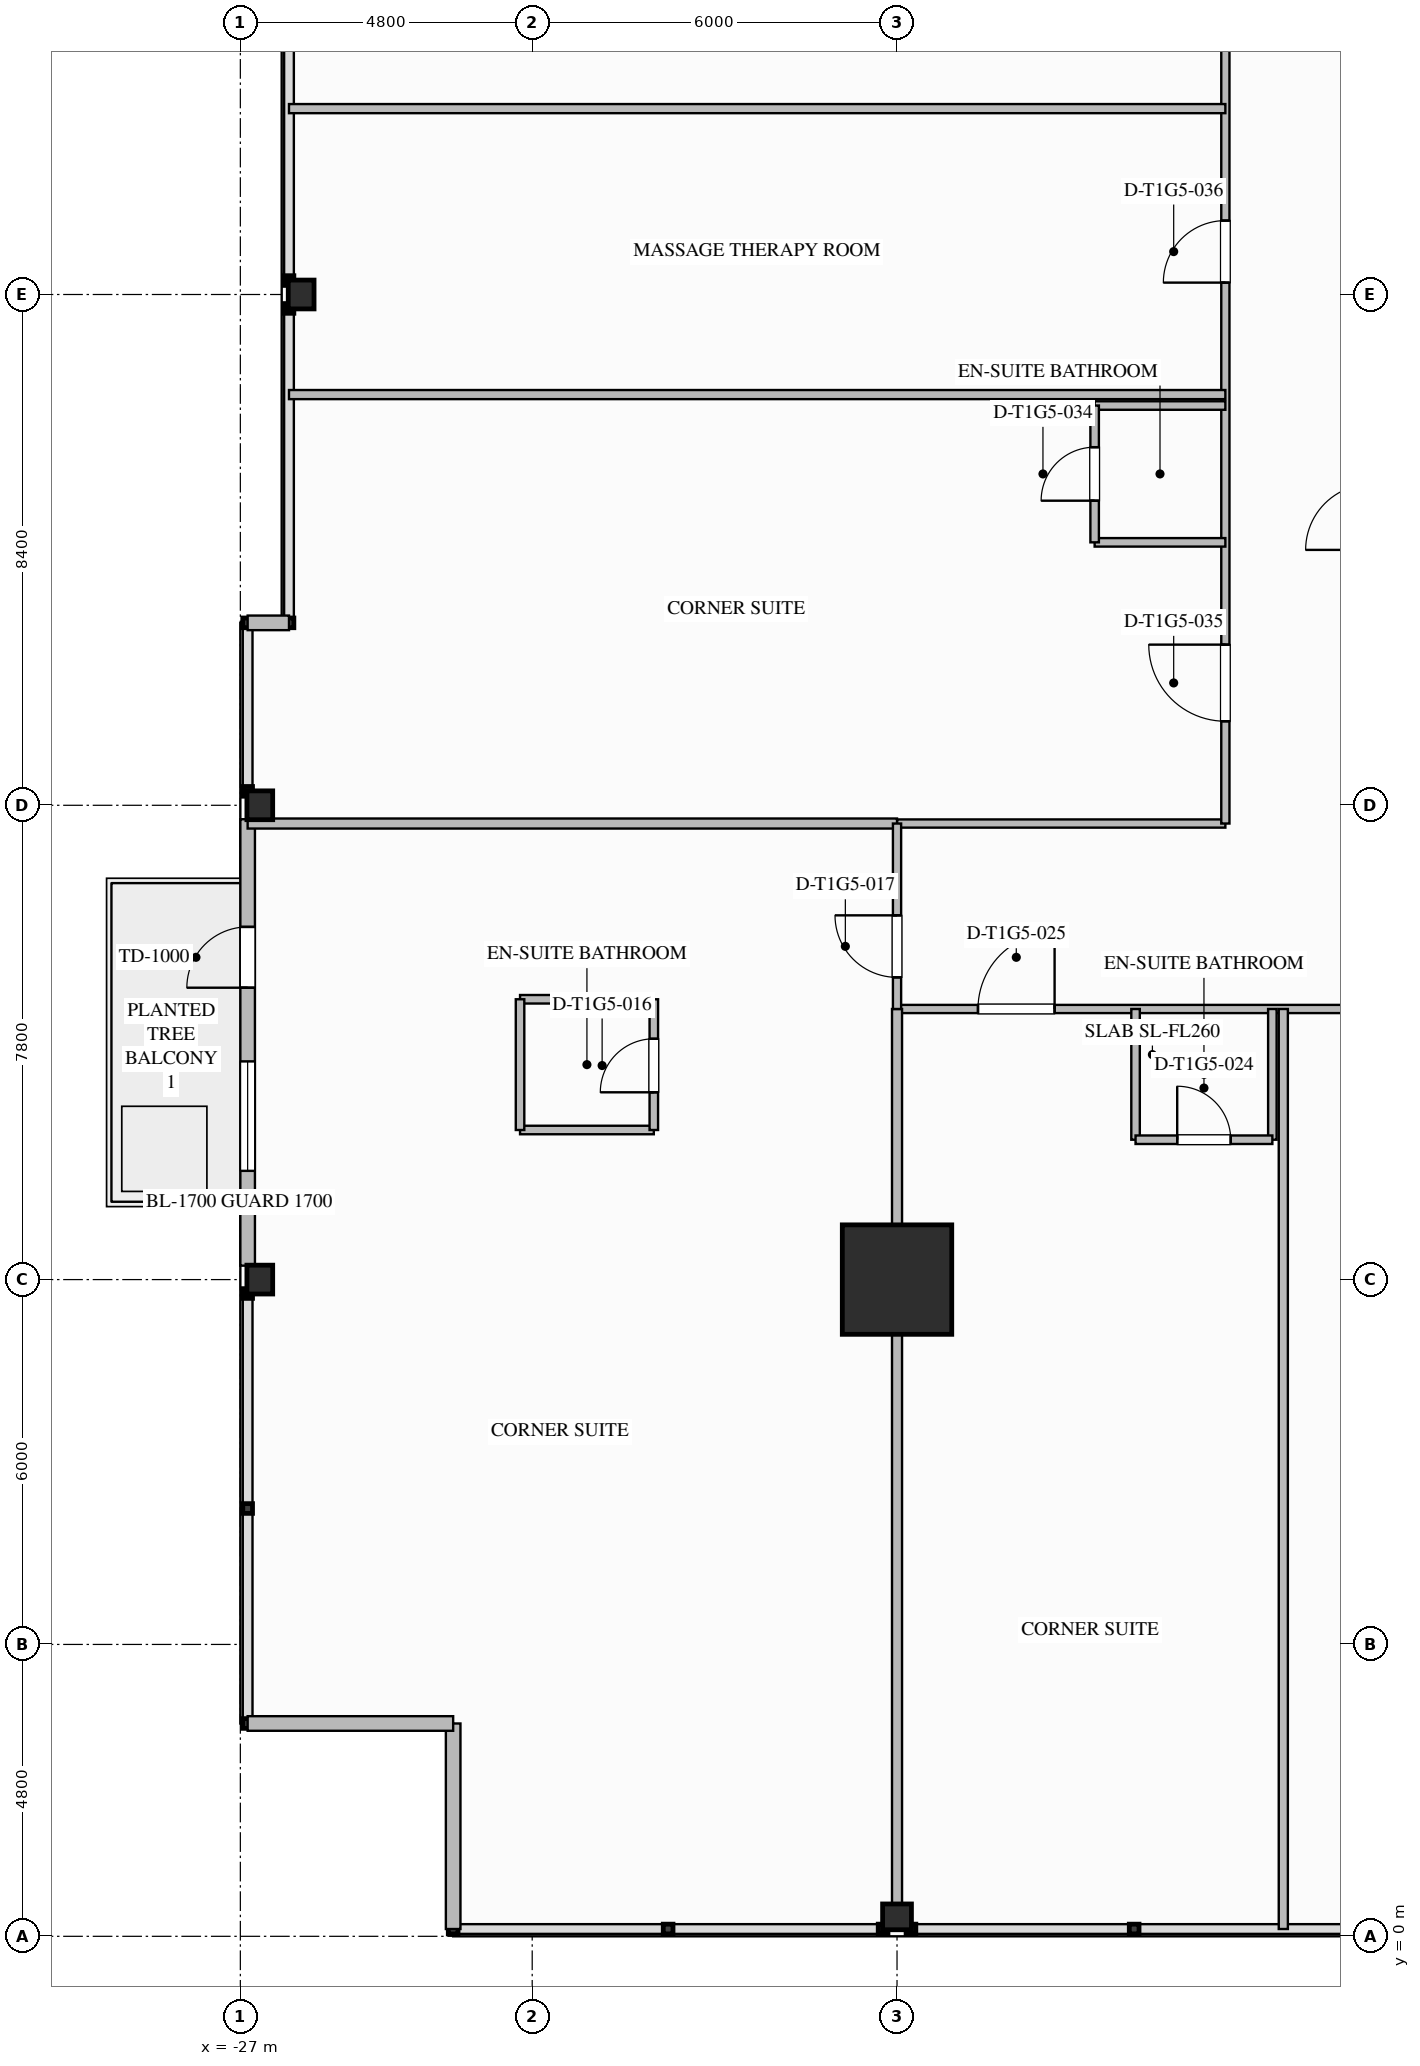
"""IFC4 building model, lengths in metres.
Left out: names, types, materials, properties, quantities, classifications, styles, units other than length and angle.
Written with IfcOpenShell. Run it as: python <this file> out.ifc"""

import sys

from ifc_helpers import new_model, si_unit, direction, frame, frame_2d, origin, origin_2d, place, context, subcontext, project, spatial, rectangle, i_section, extrude, element, fill, save


model = new_model("IFC4")
c1 = context("Model", 3, precision=1e-05, world=origin(), true_north=direction((0.0, 1.0)))
c2 = subcontext(c1, "Body", "Model", "MODEL_VIEW")
j1 = project(units=[si_unit("LENGTHUNIT", "METRE"), si_unit("PLANEANGLEUNIT", "RADIAN")], contexts=[c1])
p1 = place(None, origin())
s1 = spatial("IfcSite", under=j1, at=p1, CompositionType="ELEMENT")
p2 = place(p1, origin())
s2 = spatial("IfcBuilding", under=s1, at=p2, CompositionType="ELEMENT")
p3 = place(p2, frame((0.0, 0.0, 75.2)))
s3 = spatial("IfcBuildingStorey", under=s2, at=p3, CompositionType="ELEMENT", Elevation=75.2)
p4 = place(p3, frame((-16.2, 10.8, 0.0), z_axis=(0.0, 0.0, 1.0), x_axis=(1.0, 0.0, 0.0)))
e1 = element("IfcColumn", 1, at=p4, inside=s3, PredefinedType="COLUMN", context=c2, shape_type="SweptSolid", body=[
    extrude(rectangle(XDim=1.8, YDim=1.8, at=origin_2d()), origin(), (0.0, 0.0, 1.0), 3.5),
])
for number, where, z_axis, x_axis in (
    (2, (-26.68, 10.8, 0.0), (0.0, 0.0, 1.0), (1.0, 0.0, 0.0)),
    (3, (-26.68, 18.6, 0.0), (0.0, 0.0, 1.0), (1.0, 0.0, 0.0)),
    (4, (-26.0, 27.0, 0.0), (0.0, 0.0, 1.0), (1.0, 0.0, 0.0)),
    (5, (-16.2, 0.32, 0.0), (0.0, 0.0, 1.0), (0.0, 1.0, 0.0)),
):
    element("IfcColumn", number, at=place(p3, frame(where, z_axis=z_axis, x_axis=x_axis)), inside=s3, PredefinedType="COLUMN", context=c2, shape_type="SweptSolid", body=[
        extrude(i_section(OverallWidth=0.424, OverallDepth=0.474, WebThickness=0.048, FlangeThickness=0.077, FilletRadius=0.03, at=origin_2d()), origin(), (0.0, 0.0, 1.0), 3.497),
    ])
p5 = place(p3, frame((-26.88, 11.029, 0.0), z_axis=(0.0, 0.0, 1.0), x_axis=(0.0, 1.0, 0.0)))
e6 = element("IfcWall", 6, at=p5, inside=s3, PredefinedType="STANDARD", context=c2, shape_type="SweptSolid", body=[
    extrude(rectangle(XDim=7.342, YDim=0.24, at=frame_2d((3.671, 0.0))), origin(), (0.0, 0.0, 1.0), 2.629),
])
p6 = place(p5, frame((4.571, 0.0, 0.0)))
e7 = element("IfcOpeningElement", 7, at=p6, cuts=e6, PredefinedType="OPENING", context=c2, shape_type="SweptSolid", body=[
    extrude(rectangle(XDim=1.0, YDim=2.2, at=frame_2d((0.5, 1.1))), frame((0.0, 0.13, 0.0), z_axis=(0.0, -1.0, 0.0), x_axis=(1.0, 0.0, 0.0)), (0.0, 0.0, 1.0), 0.26),
])
p7 = place(p5, frame((1.559, 0.0, 0.75)))
e8 = element("IfcOpeningElement", 8, at=p7, cuts=e6, PredefinedType="OPENING", context=c2, shape_type="SweptSolid", body=[
    extrude(rectangle(XDim=1.8, YDim=1.779, at=frame_2d((0.9, 0.89))), frame((0.0, 0.13, 0.0), z_axis=(0.0, -1.0, 0.0), x_axis=(1.0, 0.0, 0.0)), (0.0, 0.0, 1.0), 0.26),
])
for number, where, z_axis, x_axis in (
    (9, (-23.5, 0.12, 0.0), (0.0, 0.0, 1.0), (0.0, 1.0, 0.0)),
    (10, (-23.5, 3.5, 0.0), (0.0, 0.0, 1.0), (-1.0, 0.0, 0.0)),
):
    element("IfcWall", number, at=place(p3, frame(where, z_axis=z_axis, x_axis=x_axis)), inside=s3, PredefinedType="STANDARD", context=c2, shape_type="SweptSolid", body=[
        extrude(rectangle(XDim=3.38, YDim=0.24, at=frame_2d((1.69, 0.0))), origin(), (0.0, 0.0, 1.0), 3.24),
    ])
p8 = place(p3, frame((-26.88, 21.6, 0.0), z_axis=(0.0, 0.0, 1.0), x_axis=(1.0, 0.0, 0.0)))
e11 = element("IfcWall", 11, at=p8, inside=s3, PredefinedType="STANDARD", context=c2, shape_type="SweptSolid", body=[
    extrude(rectangle(XDim=0.68, YDim=0.24, at=frame_2d((0.34, 0.0))), origin(), (0.0, 0.0, 1.0), 3.24),
])
p9 = place(p3, frame((-16.2, 15.25, 0.0), z_axis=(0.0, 0.0, 1.0), x_axis=(1.0, 0.0, 0.0)))
e12 = element("IfcWall", 12, at=p9, inside=s3, PredefinedType="PARTITIONING", context=c2, shape_type="SweptSolid", body=[
    extrude(rectangle(XDim=32.4, YDim=0.135, at=frame_2d((16.2, 0.0))), origin(), (0.0, 0.0, 1.0), 3.24),
])
p10 = place(p9, frame((1.331, 0.0, 0.0)))
e13 = element("IfcOpeningElement", 13, at=p10, cuts=e12, PredefinedType="OPENING", context=c2, shape_type="SweptSolid", body=[
    extrude(rectangle(XDim=1.26, YDim=2.2, at=frame_2d((0.63, 1.1))), frame((0.0, 0.077, 0.0), z_axis=(0.0, -1.0, 0.0), x_axis=(1.0, 0.0, 0.0)), (0.0, 0.0, 1.0), 0.155),
])
p11 = place(p9, frame((10.925, 0.0, 0.0)))
e14 = element("IfcOpeningElement", 14, at=p11, cuts=e12, PredefinedType="OPENING", context=c2, shape_type="SweptSolid", body=[
    extrude(rectangle(XDim=1.02, YDim=2.15, at=frame_2d((0.51, 1.075))), frame((0.0, 0.077, 0.0), z_axis=(0.0, -1.0, 0.0), x_axis=(1.0, 0.0, 0.0)), (0.0, 0.0, 1.0), 0.155),
])
p12 = place(p9, frame((18.167, 0.0, 0.0)))
e15 = element("IfcOpeningElement", 15, at=p12, cuts=e12, PredefinedType="OPENING", context=c2, shape_type="SweptSolid", body=[
    extrude(rectangle(XDim=1.26, YDim=2.2, at=frame_2d((0.63, 1.1))), frame((0.0, 0.077, 0.0), z_axis=(0.0, -1.0, 0.0), x_axis=(1.0, 0.0, 0.0)), (0.0, 0.0, 1.0), 0.155),
])
p13 = place(p9, frame((28.538, 0.0, 0.0)))
e16 = element("IfcOpeningElement", 16, at=p13, cuts=e12, PredefinedType="OPENING", context=c2, shape_type="SweptSolid", body=[
    extrude(rectangle(XDim=1.26, YDim=2.2, at=frame_2d((0.63, 1.1))), frame((0.0, 0.077, 0.0), z_axis=(0.0, -1.0, 0.0), x_axis=(1.0, 0.0, 0.0)), (0.0, 0.0, 1.0), 0.155),
])
p14 = place(p3, frame((-16.2, 18.3, 0.0), z_axis=(0.0, 0.0, 1.0), x_axis=(1.0, 0.0, 0.0)))
e17 = element("IfcWall", 17, at=p14, inside=s3, PredefinedType="PARTITIONING", context=c2, shape_type="SweptSolid", body=[
    extrude(rectangle(XDim=5.4, YDim=0.135, at=frame_2d((2.7, 0.0))), origin(), (0.0, 0.0, 1.0), 3.24),
])
p15 = place(p3, frame((-10.8, 18.3, 0.0), z_axis=(0.0, 0.0, 1.0), x_axis=(0.0, 1.0, 0.0)))
e18 = element("IfcWall", 18, at=p15, inside=s3, PredefinedType="PARTITIONING", context=c2, shape_type="SweptSolid", body=[
    extrude(rectangle(XDim=17.4, YDim=0.135, at=frame_2d((8.7, 0.0))), origin(), (0.0, 0.0, 1.0), 3.24),
])
p16 = place(p15, frame((1.682, 0.0, 0.0)))
e19 = element("IfcOpeningElement", 19, at=p16, cuts=e18, PredefinedType="OPENING", context=c2, shape_type="SweptSolid", body=[
    extrude(rectangle(XDim=1.26, YDim=2.2, at=frame_2d((0.63, 1.1))), frame((0.0, 0.077, 0.0), z_axis=(0.0, -1.0, 0.0), x_axis=(1.0, 0.0, 0.0)), (0.0, 0.0, 1.0), 0.155),
])
p17 = place(p15, frame((8.896, 0.0, 0.0)))
e20 = element("IfcOpeningElement", 20, at=p17, cuts=e18, PredefinedType="OPENING", context=c2, shape_type="SweptSolid", body=[
    extrude(rectangle(XDim=1.02, YDim=2.15, at=frame_2d((0.51, 1.075))), frame((0.0, 0.077, 0.0), z_axis=(0.0, -1.0, 0.0), x_axis=(1.0, 0.0, 0.0)), (0.0, 0.0, 1.0), 0.155),
])
p18 = place(p15, frame((12.733, 0.0, 0.0)))
e21 = element("IfcOpeningElement", 21, at=p18, cuts=e18, PredefinedType="OPENING", context=c2, shape_type="SweptSolid", body=[
    extrude(rectangle(XDim=1.26, YDim=2.2, at=frame_2d((0.63, 1.1))), frame((0.0, 0.077, 0.0), z_axis=(0.0, -1.0, 0.0), x_axis=(1.0, 0.0, 0.0)), (0.0, 0.0, 1.0), 0.155),
])
p19 = place(p3, frame((-16.2, 0.12, 0.0), z_axis=(0.0, 0.0, 1.0), x_axis=(0.0, 1.0, 0.0)))
e22 = element("IfcWall", 22, at=p19, inside=s3, PredefinedType="PARTITIONING", context=c2, shape_type="SweptSolid", body=[
    extrude(rectangle(XDim=15.13, YDim=0.165, at=frame_2d((7.565, 0.0))), origin(), (0.0, 0.0, 1.0), 2.452),
])
p20 = place(p3, frame((-26.88, 18.3, 0.0), z_axis=(0.0, 0.0, 1.0), x_axis=(1.0, 0.0, 0.0)))
e23 = element("IfcWall", 23, at=p20, inside=s3, PredefinedType="PARTITIONING", context=c2, shape_type="SweptSolid", body=[
    extrude(rectangle(XDim=10.68, YDim=0.165, at=frame_2d((5.34, 0.0))), origin(), (0.0, 0.0, 1.0), 2.452),
])
p21 = place(p3, frame((-16.2, 15.25, 0.0), z_axis=(0.0, 0.0, 1.0), x_axis=(0.0, 1.0, 0.0)))
e24 = element("IfcWall", 24, at=p21, inside=s3, PredefinedType="PARTITIONING", context=c2, shape_type="SweptSolid", body=[
    extrude(rectangle(XDim=3.05, YDim=0.135, at=frame_2d((1.525, 0.0))), origin(), (0.0, 0.0, 1.0), 2.452),
])
p22 = place(p21, frame((0.52, 0.0, 0.0)))
e25 = element("IfcOpeningElement", 25, at=p22, cuts=e24, PredefinedType="OPENING", context=c2, shape_type="SweptSolid", body=[
    extrude(rectangle(XDim=1.02, YDim=2.15, at=frame_2d((0.51, 1.075))), frame((0.0, 0.077, 0.0), z_axis=(0.0, -1.0, 0.0), x_axis=(1.0, 0.0, 0.0)), (0.0, 0.0, 1.0), 0.155),
])
for number, where, z_axis, x_axis in (
    (26, (-22.4, 13.26, 0.0), (0.0, 0.0, 1.0), (1.0, 0.0, 0.0)),
    (27, (-22.4, 15.41, 0.0), (0.0, 0.0, 1.0), (1.0, 0.0, 0.0)),
):
    element("IfcWall", number, at=place(p3, frame(where, z_axis=z_axis, x_axis=x_axis)), inside=s3, PredefinedType="PLUMBINGWALL", context=c2, shape_type="SweptSolid", body=[
        extrude(rectangle(XDim=2.2, YDim=0.14, at=frame_2d((1.1, 0.0))), origin(), (0.0, 0.0, 1.0), 3.24),
    ])
p23 = place(p3, frame((-22.4, 13.26, 0.0), z_axis=(0.0, 0.0, 1.0), x_axis=(0.0, 1.0, 0.0)))
e28 = element("IfcWall", 28, at=p23, inside=s3, PredefinedType="PLUMBINGWALL", context=c2, shape_type="SweptSolid", body=[
    extrude(rectangle(XDim=2.15, YDim=0.14, at=frame_2d((1.075, 0.0))), origin(), (0.0, 0.0, 1.0), 3.24),
])
p24 = place(p3, frame((-20.2, 13.26, 0.0), z_axis=(0.0, 0.0, 1.0), x_axis=(0.0, 1.0, 0.0)))
e29 = element("IfcWall", 29, at=p24, inside=s3, PredefinedType="PLUMBINGWALL", context=c2, shape_type="SweptSolid", body=[
    extrude(rectangle(XDim=2.15, YDim=0.14, at=frame_2d((1.075, 0.0))), origin(), (0.0, 0.0, 1.0), 3.24),
])
p25 = place(p24, frame((0.62, 0.0, 0.0)))
e30 = element("IfcOpeningElement", 30, at=p25, cuts=e29, PredefinedType="OPENING", context=c2, shape_type="SweptSolid", body=[
    extrude(rectangle(XDim=0.88, YDim=2.1, at=frame_2d((0.44, 1.05))), frame((0.0, 0.08, 0.0), z_axis=(0.0, -1.0, 0.0), x_axis=(1.0, 0.0, 0.0)), (0.0, 0.0, 1.0), 0.16),
])
p26 = place(p3, frame((-12.277, 15.25, 0.0), z_axis=(0.0, 0.0, 1.0), x_axis=(0.0, -1.0, 0.0)))
e31 = element("IfcWall", 31, at=p26, inside=s3, PredefinedType="PLUMBINGWALL", context=c2, shape_type="SweptSolid", body=[
    extrude(rectangle(XDim=2.15, YDim=0.14, at=frame_2d((1.075, 0.0))), origin(), (0.0, 0.0, 1.0), 2.765),
])
p27 = place(p3, frame((-10.027, 15.25, 0.0), z_axis=(0.0, 0.0, 1.0), x_axis=(0.0, -1.0, 0.0)))
e32 = element("IfcWall", 32, at=p27, inside=s3, PredefinedType="PLUMBINGWALL", context=c2, shape_type="SweptSolid", body=[
    extrude(rectangle(XDim=2.15, YDim=0.14, at=frame_2d((1.075, 0.0))), origin(), (0.0, 0.0, 1.0), 3.24),
])
p28 = place(p3, frame((-12.277, 13.1, 0.0), z_axis=(0.0, 0.0, 1.0), x_axis=(1.0, 0.0, 0.0)))
e33 = element("IfcWall", 33, at=p28, inside=s3, PredefinedType="PLUMBINGWALL", context=c2, shape_type="SweptSolid", body=[
    extrude(rectangle(XDim=2.25, YDim=0.14, at=frame_2d((1.125, 0.0))), origin(), (0.0, 0.0, 1.0), 3.24),
])
p29 = place(p28, frame((0.685, 0.0, 0.0)))
e34 = element("IfcOpeningElement", 34, at=p29, cuts=e33, PredefinedType="OPENING", context=c2, shape_type="SweptSolid", body=[
    extrude(rectangle(XDim=0.88, YDim=2.1, at=frame_2d((0.44, 1.05))), frame((0.0, 0.08, 0.0), z_axis=(0.0, -1.0, 0.0), x_axis=(1.0, 0.0, 0.0)), (0.0, 0.0, 1.0), 0.16),
])
p30 = place(p3, frame((-9.847, 0.12, 0.0), z_axis=(0.0, 0.0, 1.0), x_axis=(0.0, 1.0, 0.0)))
e35 = element("IfcWall", 35, at=p30, inside=s3, PredefinedType="PARTITIONING", context=c2, shape_type="SweptSolid", body=[
    extrude(rectangle(XDim=15.13, YDim=0.15, at=frame_2d((7.565, 0.0))), origin(), (0.0, 0.0, 1.0), 3.24),
])
for number, where, z_axis, x_axis in (
    (36, (-10.8, 22.924, 0.0), (0.0, 0.0, 1.0), (-1.0, 0.0, 0.0)),
    (37, (-10.8, 25.174, 0.0), (0.0, 0.0, 1.0), (-1.0, 0.0, 0.0)),
):
    element("IfcWall", number, at=place(p3, frame(where, z_axis=z_axis, x_axis=x_axis)), inside=s3, PredefinedType="PLUMBINGWALL", context=c2, shape_type="SweptSolid", body=[
        extrude(rectangle(XDim=2.15, YDim=0.14, at=frame_2d((1.075, 0.0))), origin(), (0.0, 0.0, 1.0), 3.24),
    ])
p31 = place(p3, frame((-12.95, 22.924, 0.0), z_axis=(0.0, 0.0, 1.0), x_axis=(0.0, 1.0, 0.0)))
e38 = element("IfcWall", 38, at=p31, inside=s3, PredefinedType="PLUMBINGWALL", context=c2, shape_type="SweptSolid", body=[
    extrude(rectangle(XDim=2.25, YDim=0.14, at=frame_2d((1.125, 0.0))), origin(), (0.0, 0.0, 1.0), 3.24),
])
p32 = place(p31, frame((0.685, 0.0, 0.0)))
e39 = element("IfcOpeningElement", 39, at=p32, cuts=e38, PredefinedType="OPENING", context=c2, shape_type="SweptSolid", body=[
    extrude(rectangle(XDim=0.88, YDim=2.1, at=frame_2d((0.44, 1.05))), frame((0.0, 0.08, 0.0), z_axis=(0.0, -1.0, 0.0), x_axis=(1.0, 0.0, 0.0)), (0.0, 0.0, 1.0), 0.16),
])
for number, where, z_axis, x_axis in (
    (40, (-26.2, 25.354, 0.0), (0.0, 0.0, 1.0), (1.0, 0.0, 0.0)),
    (41, (-26.2, 30.057, 0.0), (0.0, 0.0, 1.0), (1.0, 0.0, 0.0)),
):
    element("IfcWall", number, at=place(p3, frame(where, z_axis=z_axis, x_axis=x_axis)), inside=s3, PredefinedType="PARTITIONING", context=c2, shape_type="SweptSolid", body=[
        extrude(rectangle(XDim=15.4, YDim=0.15, at=frame_2d((7.7, 0.0))), origin(), (0.0, 0.0, 1.0), 3.24),
    ])
p33 = place(p6, origin())
e42 = element("IfcDoor", 42, at=p33, inside=s3, OperationType="SINGLE_SWING_LEFT", PredefinedType="DOOR", context=c2, shape_type="SweptSolid", body=[
    extrude(rectangle(XDim=1.0, YDim=2.2, at=frame_2d((0.5, 1.1))), frame((0.0, 0.025, 0.0), z_axis=(0.0, -1.0, 0.0), x_axis=(1.0, 0.0, 0.0)), (0.0, 0.0, 1.0), 0.05),
])
fill(e7, e42)
p34 = place(p7, origin())
e43 = element("IfcWindow", 43, at=p34, inside=s3, PartitioningType="SINGLE_PANEL", PredefinedType="WINDOW", context=c2, shape_type="SweptSolid", body=[
    extrude(rectangle(XDim=1.8, YDim=1.779, at=frame_2d((0.9, 0.89))), frame((0.0, 0.03, 0.0), z_axis=(0.0, -1.0, 0.0), x_axis=(1.0, 0.0, 0.0)), (0.0, 0.0, 1.0), 0.06),
])
fill(e8, e43)
p35 = place(p25, origin())
e44 = element("IfcDoor", 44, at=p35, inside=s3, OperationType="SINGLE_SWING_LEFT", PredefinedType="DOOR", context=c2, shape_type="SweptSolid", body=[
    extrude(rectangle(XDim=0.88, YDim=2.1, at=frame_2d((0.44, 1.05))), frame((0.0, 0.025, 0.0), z_axis=(0.0, -1.0, 0.0), x_axis=(1.0, 0.0, 0.0)), (0.0, 0.0, 1.0), 0.05),
])
fill(e30, e44)
p36 = place(p22, origin())
e45 = element("IfcDoor", 45, at=p36, inside=s3, OperationType="SINGLE_SWING_RIGHT", PredefinedType="DOOR", context=c2, shape_type="SweptSolid", body=[
    extrude(rectangle(XDim=1.02, YDim=2.15, at=frame_2d((0.51, 1.075))), frame((0.0, 0.025, 0.0), z_axis=(0.0, -1.0, 0.0), x_axis=(1.0, 0.0, 0.0)), (0.0, 0.0, 1.0), 0.05),
])
fill(e25, e45)
p37 = place(p29, origin())
e46 = element("IfcDoor", 46, at=p37, inside=s3, OperationType="SINGLE_SWING_LEFT", PredefinedType="DOOR", context=c2, shape_type="SweptSolid", body=[
    extrude(rectangle(XDim=0.88, YDim=2.1, at=frame_2d((0.44, 1.05))), frame((0.0, 0.025, 0.0), z_axis=(0.0, -1.0, 0.0), x_axis=(1.0, 0.0, 0.0)), (0.0, 0.0, 1.0), 0.05),
])
fill(e34, e46)
p38 = place(p10, origin())
e47 = element("IfcDoor", 47, at=p38, inside=s3, OperationType="SINGLE_SWING_RIGHT", PredefinedType="DOOR", context=c2, shape_type="SweptSolid", body=[
    extrude(rectangle(XDim=1.26, YDim=2.2, at=frame_2d((0.63, 1.1))), frame((0.0, 0.025, 0.0), z_axis=(0.0, -1.0, 0.0), x_axis=(1.0, 0.0, 0.0)), (0.0, 0.0, 1.0), 0.05),
])
fill(e13, e47)
p39 = place(p32, origin())
e48 = element("IfcDoor", 48, at=p39, inside=s3, OperationType="SINGLE_SWING_LEFT", PredefinedType="DOOR", context=c2, shape_type="SweptSolid", body=[
    extrude(rectangle(XDim=0.88, YDim=2.1, at=frame_2d((0.44, 1.05))), frame((0.0, 0.025, 0.0), z_axis=(0.0, -1.0, 0.0), x_axis=(1.0, 0.0, 0.0)), (0.0, 0.0, 1.0), 0.05),
])
fill(e39, e48)
p40 = place(p16, origin())
e49 = element("IfcDoor", 49, at=p40, inside=s3, OperationType="SINGLE_SWING_RIGHT", PredefinedType="DOOR", context=c2, shape_type="SweptSolid", body=[
    extrude(rectangle(XDim=1.26, YDim=2.2, at=frame_2d((0.63, 1.1))), frame((0.0, 0.025, 0.0), z_axis=(0.0, -1.0, 0.0), x_axis=(1.0, 0.0, 0.0)), (0.0, 0.0, 1.0), 0.05),
])
fill(e19, e49)
p41 = place(p17, origin())
e50 = element("IfcDoor", 50, at=p41, inside=s3, OperationType="SINGLE_SWING_LEFT", PredefinedType="DOOR", context=c2, shape_type="SweptSolid", body=[
    extrude(rectangle(XDim=1.02, YDim=2.15, at=frame_2d((0.51, 1.075))), frame((0.0, 0.025, 0.0), z_axis=(0.0, -1.0, 0.0), x_axis=(1.0, 0.0, 0.0)), (0.0, 0.0, 1.0), 0.05),
])
fill(e20, e50)
save(model, sys.argv[1])
